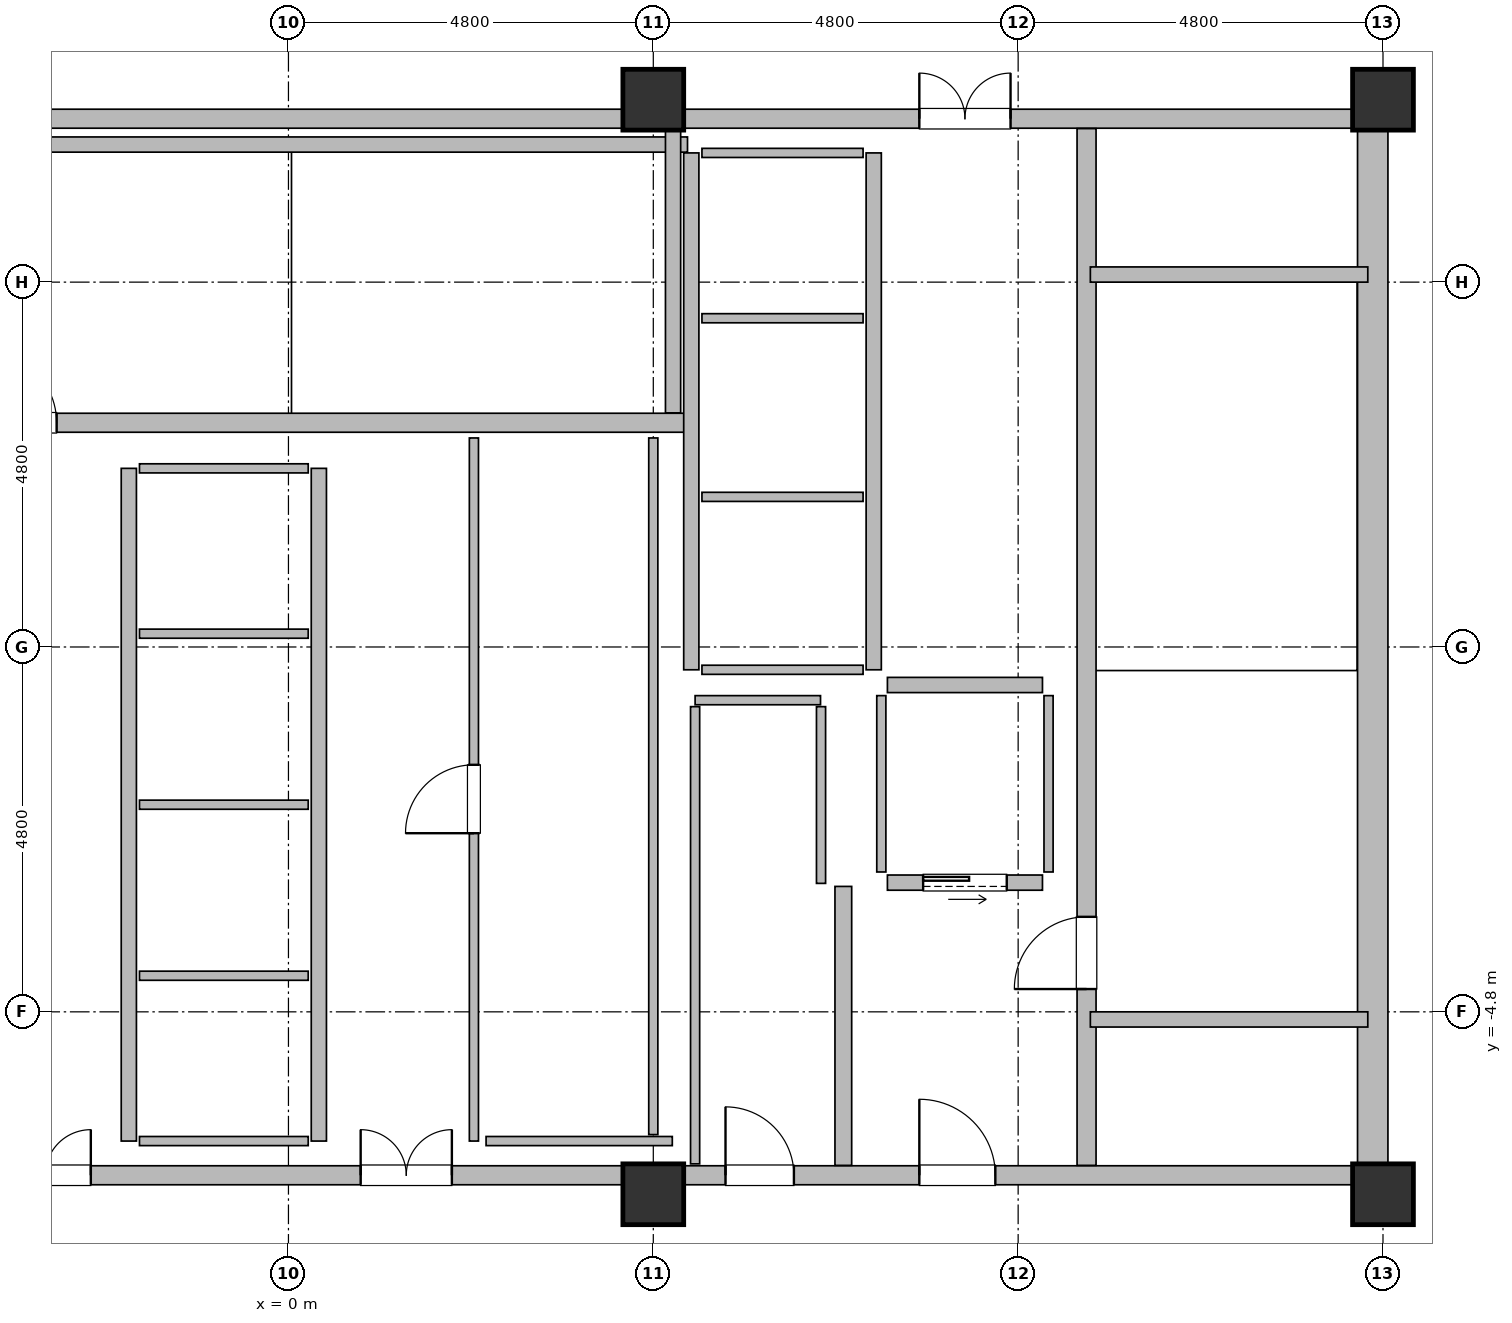
"""IFC4 building model, lengths in metres.
Left out: names, types, materials, properties, quantities, classifications, styles, units other than length and angle.
Written with IfcOpenShell. Run it as: python <this file> out.ifc"""

import sys

from ifc_helpers import new_model, si_unit, direction, frame, frame_2d, origin, origin_2d, place, context, subcontext, project, spatial, rectangle, hollow_rectangle, extrude, element, fill, save


model = new_model("IFC4")
c1 = context("Model", 3, precision=1e-05, world=origin(), true_north=direction((0.0, 1.0)))
c2 = subcontext(c1, "Body", "Model", "MODEL_VIEW")
j1 = project(units=[si_unit("LENGTHUNIT", "METRE"), si_unit("PLANEANGLEUNIT", "RADIAN")], contexts=[c1])
p1 = place(None, origin())
s1 = spatial("IfcSite", under=j1, at=p1, CompositionType="ELEMENT")
p2 = place(p1, origin())
s2 = spatial("IfcBuilding", under=s1, at=p2, CompositionType="ELEMENT")
p3 = place(p2, frame((0.0, 0.0, 48.5)))
s3 = spatial("IfcBuildingStorey", under=s2, at=p3, CompositionType="ELEMENT", Elevation=48.5)
for number, where, z_axis, x_axis in (
    (1, (4.8, -7.2, 0.0), (0.0, 0.0, 1.0), (1.0, 0.0, 0.0)),
    (2, (4.8, 7.2, 0.0), (0.0, 0.0, 1.0), (1.0, 0.0, 0.0)),
    (3, (14.4, -7.2, 0.0), (0.0, 0.0, 1.0), (1.0, 0.0, 0.0)),
    (4, (14.4, 7.2, 0.0), (0.0, 0.0, 1.0), (1.0, 0.0, 0.0)),
):
    element("IfcColumn", number, at=place(p3, frame(where, z_axis=z_axis, x_axis=x_axis)), inside=s3, PredefinedType="COLUMN", context=c2, shape_type="SweptSolid", body=[
        extrude(hollow_rectangle(XDim=0.8, YDim=0.8, WallThickness=0.036, at=origin_2d()), origin(), (0.0, 0.0, 1.0), 3.7),
    ])
p4 = place(p3, frame((14.265, -7.2, -0.18), z_axis=(0.0, 0.0, 1.0), x_axis=(0.0, 1.0, 0.0)))
e5 = element("IfcWall", 5, at=p4, inside=s3, PredefinedType="SHEAR", context=c2, shape_type="SweptSolid", body=[
    extrude(rectangle(XDim=14.4, YDim=0.4, at=frame_2d((7.2, 0.0))), origin(), (0.0, 0.0, 1.0), 3.7),
])
p5 = place(p3, frame((-4.6, -6.95, 0.0), z_axis=(0.0, 0.0, 1.0), x_axis=(1.0, 0.0, 0.0)))
e6 = element("IfcWall", 6, at=p5, inside=s3, PredefinedType="SOLIDWALL", context=c2, shape_type="SweptSolid", body=[
    extrude(rectangle(XDim=9.2, YDim=0.25, at=frame_2d((4.6, 0.0))), origin(), (0.0, 0.0, 1.0), 2.32),
])
p6 = place(p5, frame((0.8, 0.0, 0.0)))
e7 = element("IfcOpeningElement", 7, at=p6, cuts=e6, PredefinedType="OPENING", context=c2, shape_type="SweptSolid", body=[
    extrude(rectangle(XDim=1.2, YDim=2.2, at=frame_2d((0.6, 1.1))), frame((0.0, 0.14, 0.0), z_axis=(0.0, -1.0, 0.0), x_axis=(1.0, 0.0, 0.0)), (0.0, 0.0, 1.0), 0.28),
])
p7 = place(p5, frame((5.55, 0.0, 0.0)))
e8 = element("IfcOpeningElement", 8, at=p7, cuts=e6, PredefinedType="OPENING", context=c2, shape_type="SweptSolid", body=[
    extrude(rectangle(XDim=1.2, YDim=2.2, at=frame_2d((0.6, 1.1))), frame((0.0, 0.14, 0.0), z_axis=(0.0, -1.0, 0.0), x_axis=(1.0, 0.0, 0.0)), (0.0, 0.0, 1.0), 0.28),
])
p8 = place(p3, frame((4.8, -6.95, 0.0), z_axis=(0.0, 0.0, 1.0), x_axis=(1.0, 0.0, 0.0)))
e9 = element("IfcWall", 9, at=p8, inside=s3, PredefinedType="SOLIDWALL", context=c2, shape_type="SweptSolid", body=[
    extrude(rectangle(XDim=9.4, YDim=0.25, at=frame_2d((4.7, 0.0))), origin(), (0.0, 0.0, 1.0), 2.62),
])
p9 = place(p8, frame((3.5, 0.0, 0.0)))
e10 = element("IfcOpeningElement", 10, at=p9, cuts=e9, PredefinedType="OPENING", context=c2, shape_type="SweptSolid", body=[
    extrude(rectangle(XDim=1.0, YDim=2.15, at=frame_2d((0.5, 1.075))), frame((0.0, 0.14, 0.0), z_axis=(0.0, -1.0, 0.0), x_axis=(1.0, 0.0, 0.0)), (0.0, 0.0, 1.0), 0.28),
])
p10 = place(p8, frame((0.95, 0.0, 0.0)))
e11 = element("IfcOpeningElement", 11, at=p10, cuts=e9, PredefinedType="OPENING", context=c2, shape_type="SweptSolid", body=[
    extrude(rectangle(XDim=0.9, YDim=2.1, at=frame_2d((0.45, 1.05))), frame((0.0, 0.14, 0.0), z_axis=(0.0, -1.0, 0.0), x_axis=(1.0, 0.0, 0.0)), (0.0, 0.0, 1.0), 0.28),
])
p11 = place(p3, frame((-4.6, 6.95, 0.0), z_axis=(0.0, 0.0, 1.0), x_axis=(1.0, 0.0, 0.0)))
e12 = element("IfcWall", 12, at=p11, inside=s3, PredefinedType="SOLIDWALL", context=c2, shape_type="SweptSolid", body=[
    extrude(rectangle(XDim=9.2, YDim=0.25, at=frame_2d((4.6, 0.0))), origin(), (0.0, 0.0, 1.0), 2.62),
])
p12 = place(p3, frame((4.8, 6.95, 0.0), z_axis=(0.0, 0.0, 1.0), x_axis=(1.0, 0.0, 0.0)))
e13 = element("IfcWall", 13, at=p12, inside=s3, PredefinedType="SOLIDWALL", context=c2, shape_type="SweptSolid", body=[
    extrude(rectangle(XDim=9.4, YDim=0.25, at=frame_2d((4.7, 0.0))), origin(), (0.0, 0.0, 1.0), 2.62),
])
p13 = place(p12, frame((3.5, 0.0, 0.0)))
e14 = element("IfcOpeningElement", 14, at=p13, cuts=e13, PredefinedType="OPENING", context=c2, shape_type="SweptSolid", body=[
    extrude(rectangle(XDim=1.2, YDim=2.2, at=frame_2d((0.6, 1.1))), frame((0.0, 0.14, 0.0), z_axis=(0.0, -1.0, 0.0), x_axis=(1.0, 0.0, 0.0)), (0.0, 0.0, 1.0), 0.28),
])
p14 = place(p3, frame((7.3, -6.82, 0.0), z_axis=(0.0, 0.0, 1.0), x_axis=(0.0, 1.0, 0.0)))
e15 = element("IfcWall", 15, at=p14, inside=s3, PredefinedType="SOLIDWALL", context=c2, shape_type="SweptSolid", body=[
    extrude(rectangle(XDim=3.67, YDim=0.22, at=frame_2d((1.835, 0.0))), origin(), (0.0, 0.0, 1.0), 2.62),
])
p15 = place(p3, frame((10.5, -6.82, -0.18), z_axis=(0.0, 0.0, 1.0), x_axis=(0.0, 1.0, 0.0)))
e16 = element("IfcWall", 16, at=p15, inside=s3, PredefinedType="SOLIDWALL", context=c2, shape_type="SweptSolid", body=[
    extrude(rectangle(XDim=13.64, YDim=0.25, at=frame_2d((6.82, 0.0))), origin(), (0.0, 0.0, 1.0), 3.7),
])
p16 = place(p15, frame((2.32, 0.0, 0.18)))
e17 = element("IfcOpeningElement", 17, at=p16, cuts=e16, PredefinedType="OPENING", context=c2, shape_type="SweptSolid", body=[
    extrude(rectangle(XDim=0.95, YDim=2.15, at=frame_2d((0.475, 1.075))), frame((0.0, 0.14, 0.0), z_axis=(0.0, -1.0, 0.0), x_axis=(1.0, 0.0, 0.0)), (0.0, 0.0, 1.0), 0.28),
])
for number, where, z_axis, x_axis in (
    (18, (10.55, -4.9, -0.18), (0.0, 0.0, 1.0), (1.0, 0.0, 0.0)),
    (19, (10.55, 4.9, -0.18), (0.0, 0.0, 1.0), (1.0, 0.0, 0.0)),
):
    element("IfcWall", number, at=place(p3, frame(where, z_axis=z_axis, x_axis=x_axis)), inside=s3, PredefinedType="SOLIDWALL", context=c2, shape_type="SweptSolid", body=[
        extrude(rectangle(XDim=3.65, YDim=0.2, at=frame_2d((1.825, 0.0))), origin(), (0.0, 0.0, 1.0), 3.7),
    ])
p17 = place(p3, frame((-4.65, 2.95, -0.18), z_axis=(0.0, 0.0, 1.0), x_axis=(1.0, 0.0, 0.0)))
e20 = element("IfcWall", 20, at=p17, inside=s3, PredefinedType="SOLIDWALL", context=c2, shape_type="SweptSolid", body=[
    extrude(rectangle(XDim=9.9, YDim=0.25, at=frame_2d((4.95, 0.0))), origin(), (0.0, 0.0, 1.0), 3.7),
])
p18 = place(p17, frame((0.65, 0.0, 0.18)))
e21 = element("IfcOpeningElement", 21, at=p18, cuts=e20, PredefinedType="OPENING", context=c2, shape_type="SweptSolid", body=[
    extrude(rectangle(XDim=0.95, YDim=2.15, at=frame_2d((0.475, 1.075))), frame((0.0, 0.14, 0.0), z_axis=(0.0, -1.0, 0.0), x_axis=(1.0, 0.0, 0.0)), (0.0, 0.0, 1.0), 0.28),
])
p19 = place(p3, frame((-4.65, 6.61, -0.18), z_axis=(0.0, 0.0, 1.0), x_axis=(1.0, 0.0, 0.0)))
e22 = element("IfcWall", 22, at=p19, inside=s3, PredefinedType="SOLIDWALL", context=c2, shape_type="SweptSolid", body=[
    extrude(rectangle(XDim=9.9, YDim=0.2, at=frame_2d((4.95, 0.0))), origin(), (0.0, 0.0, 1.0), 3.7),
])
p20 = place(p3, frame((5.06, 3.08, -0.18), z_axis=(0.0, 0.0, 1.0), x_axis=(0.0, 1.0, 0.0)))
e23 = element("IfcWall", 23, at=p20, inside=s3, PredefinedType="SOLIDWALL", context=c2, shape_type="SweptSolid", body=[
    extrude(rectangle(XDim=3.74, YDim=0.2, at=frame_2d((1.87, 0.0))), origin(), (0.0, 0.0, 1.0), 3.7),
])
for number, where, z_axis, x_axis in (
    (24, (-2.1, -6.5, 0.0), (0.0, 0.0, 1.0), (0.0, 1.0, 0.0)),
    (25, (0.4, -6.5, 0.0), (0.0, 0.0, 1.0), (0.0, 1.0, 0.0)),
):
    element("IfcWall", number, at=place(p3, frame(where, z_axis=z_axis, x_axis=x_axis)), inside=s3, PredefinedType="SOLIDWALL", context=c2, shape_type="SweptSolid", body=[
        extrude(rectangle(XDim=8.85, YDim=0.2, at=frame_2d((4.425, 0.0))), origin(), (0.0, 0.0, 1.0), 3.52),
    ])
for number, where, z_axis, x_axis in (
    (26, (-1.96, -6.5, 0.0), (0.0, 0.0, 1.0), (1.0, 0.0, 0.0)),
    (27, (-1.96, -4.325, 0.0), (0.0, 0.0, 1.0), (1.0, 0.0, 0.0)),
    (28, (-1.96, -2.075, 0.0), (0.0, 0.0, 1.0), (1.0, 0.0, 0.0)),
    (29, (-1.96, 0.175, 0.0), (0.0, 0.0, 1.0), (1.0, 0.0, 0.0)),
    (30, (-1.96, 2.35, 0.0), (0.0, 0.0, 1.0), (1.0, 0.0, 0.0)),
):
    element("IfcWall", number, at=place(p3, frame(where, z_axis=z_axis, x_axis=x_axis)), inside=s3, PredefinedType="PARTITIONING", context=c2, shape_type="SweptSolid", body=[
        extrude(rectangle(XDim=2.22, YDim=0.12, at=frame_2d((1.11, 0.0))), origin(), (0.0, 0.0, 1.0), 3.52),
    ])
for number, where, z_axis, x_axis in (
    (31, (7.7, -0.3, 0.0), (0.0, 0.0, 1.0), (0.0, 1.0, 0.0)),
    (32, (5.3, -0.3, 0.0), (0.0, 0.0, 1.0), (0.0, 1.0, 0.0)),
):
    element("IfcWall", number, at=place(p3, frame(where, z_axis=z_axis, x_axis=x_axis)), inside=s3, PredefinedType="SOLIDWALL", context=c2, shape_type="SweptSolid", body=[
        extrude(rectangle(XDim=6.8, YDim=0.2, at=frame_2d((3.4, 0.0))), origin(), (0.0, 0.0, 1.0), 3.52),
    ])
for number, where, z_axis, x_axis in (
    (33, (5.44, -0.3, 0.0), (0.0, 0.0, 1.0), (1.0, 0.0, 0.0)),
    (34, (5.44, 1.975, 0.0), (0.0, 0.0, 1.0), (1.0, 0.0, 0.0)),
    (35, (5.44, 4.325, 0.0), (0.0, 0.0, 1.0), (1.0, 0.0, 0.0)),
    (36, (5.44, 6.5, 0.0), (0.0, 0.0, 1.0), (1.0, 0.0, 0.0)),
):
    element("IfcWall", number, at=place(p3, frame(where, z_axis=z_axis, x_axis=x_axis)), inside=s3, PredefinedType="PARTITIONING", context=c2, shape_type="SweptSolid", body=[
        extrude(rectangle(XDim=2.12, YDim=0.12, at=frame_2d((1.06, 0.0))), origin(), (0.0, 0.0, 1.0), 3.52),
    ])
p21 = place(p3, frame((7.88, -3.1, 0.0), z_axis=(0.0, 0.0, 1.0), x_axis=(1.0, 0.0, 0.0)))
e37 = element("IfcWall", 37, at=p21, inside=s3, PredefinedType="SOLIDWALL", context=c2, shape_type="SweptSolid", body=[
    extrude(rectangle(XDim=2.04, YDim=0.2, at=frame_2d((1.02, 0.0))), origin(), (0.0, 0.0, 1.0), 3.52),
])
p22 = place(p21, frame((0.47, 0.0, 0.0)))
e38 = element("IfcOpeningElement", 38, at=p22, cuts=e37, PredefinedType="OPENING", context=c2, shape_type="SweptSolid", body=[
    extrude(rectangle(XDim=1.1, YDim=2.2, at=frame_2d((0.55, 1.1))), frame((0.0, 0.115, 0.0), z_axis=(0.0, -1.0, 0.0), x_axis=(1.0, 0.0, 0.0)), (0.0, 0.0, 1.0), 0.23),
])
p23 = place(p3, frame((7.88, -0.5, 0.0), z_axis=(0.0, 0.0, 1.0), x_axis=(1.0, 0.0, 0.0)))
e39 = element("IfcWall", 39, at=p23, inside=s3, PredefinedType="SOLIDWALL", context=c2, shape_type="SweptSolid", body=[
    extrude(rectangle(XDim=2.04, YDim=0.2, at=frame_2d((1.02, 0.0))), origin(), (0.0, 0.0, 1.0), 3.52),
])
for number, where, z_axis, x_axis in (
    (40, (7.8, -2.96, 0.0), (0.0, 0.0, 1.0), (0.0, 1.0, 0.0)),
    (41, (10.0, -2.96, 0.0), (0.0, 0.0, 1.0), (0.0, 1.0, 0.0)),
):
    element("IfcWall", number, at=place(p3, frame(where, z_axis=z_axis, x_axis=x_axis)), inside=s3, PredefinedType="PARTITIONING", context=c2, shape_type="SweptSolid", body=[
        extrude(rectangle(XDim=2.32, YDim=0.12, at=frame_2d((1.16, 0.0))), origin(), (0.0, 0.0, 1.0), 3.52),
    ])
p24 = place(p3, frame((2.6, -6.5, 0.0), z_axis=(0.0, 0.0, 1.0), x_axis=(1.0, 0.0, 0.0)))
e42 = element("IfcWall", 42, at=p24, inside=s3, PredefinedType="PARTITIONING", context=c2, shape_type="SweptSolid", body=[
    extrude(rectangle(XDim=2.45, YDim=0.12, at=frame_2d((1.225, 0.0))), origin(), (0.0, 0.0, 1.0), 3.52),
])
p25 = place(p3, frame((5.35, -0.7, 0.0), z_axis=(0.0, 0.0, 1.0), x_axis=(1.0, 0.0, 0.0)))
e43 = element("IfcWall", 43, at=p25, inside=s3, PredefinedType="PARTITIONING", context=c2, shape_type="SweptSolid", body=[
    extrude(rectangle(XDim=1.65, YDim=0.12, at=frame_2d((0.825, 0.0))), origin(), (0.0, 0.0, 1.0), 3.52),
])
p26 = place(p3, frame((2.44, -6.5, 0.0), z_axis=(0.0, 0.0, 1.0), x_axis=(0.0, 1.0, 0.0)))
e44 = element("IfcWall", 44, at=p26, inside=s3, PredefinedType="PARTITIONING", context=c2, shape_type="SweptSolid", body=[
    extrude(rectangle(XDim=9.25, YDim=0.12, at=frame_2d((4.625, 0.0))), origin(), (0.0, 0.0, 1.0), 3.52),
])
p27 = place(p26, frame((4.05, 0.0, 0.0)))
e45 = element("IfcOpeningElement", 45, at=p27, cuts=e44, PredefinedType="OPENING", context=c2, shape_type="SweptSolid", body=[
    extrude(rectangle(XDim=0.9, YDim=2.1, at=frame_2d((0.45, 1.05))), frame((0.0, 0.075, 0.0), z_axis=(0.0, -1.0, 0.0), x_axis=(1.0, 0.0, 0.0)), (0.0, 0.0, 1.0), 0.15),
])
p28 = place(p3, frame((4.8, -6.415, 0.0), z_axis=(0.0, 0.0, 1.0), x_axis=(0.0, 1.0, 0.0)))
e46 = element("IfcWall", 46, at=p28, inside=s3, PredefinedType="PARTITIONING", context=c2, shape_type="SweptSolid", body=[
    extrude(rectangle(XDim=9.165, YDim=0.12, at=frame_2d((4.583, 0.0))), origin(), (0.0, 0.0, 1.0), 3.52),
])
p29 = place(p3, frame((5.35, -6.8, 0.0), z_axis=(0.0, 0.0, 1.0), x_axis=(0.0, 1.0, 0.0)))
e47 = element("IfcWall", 47, at=p29, inside=s3, PredefinedType="PARTITIONING", context=c2, shape_type="SweptSolid", body=[
    extrude(rectangle(XDim=6.015, YDim=0.12, at=frame_2d((3.008, 0.0))), origin(), (0.0, 0.0, 1.0), 2.62),
])
p30 = place(p3, frame((7.007, -3.11, 0.0), z_axis=(0.0, 0.0, 1.0), x_axis=(0.0, 1.0, 0.0)))
e48 = element("IfcWall", 48, at=p30, inside=s3, PredefinedType="PARTITIONING", context=c2, shape_type="SweptSolid", body=[
    extrude(rectangle(XDim=2.325, YDim=0.12, at=frame_2d((1.163, 0.0))), origin(), (0.0, 0.0, 1.0), 3.52),
])
p31 = place(p9, origin())
e49 = element("IfcDoor", 49, at=p31, inside=s3, OperationType="SINGLE_SWING_RIGHT", PredefinedType="DOOR", context=c2, shape_type="SweptSolid", body=[
    extrude(rectangle(XDim=1.0, YDim=2.15, at=frame_2d((0.5, 1.075))), frame((0.0, 0.025, 0.0), z_axis=(0.0, -1.0, 0.0), x_axis=(1.0, 0.0, 0.0)), (0.0, 0.0, 1.0), 0.05),
])
fill(e10, e49)
p32 = place(p6, origin())
e50 = element("IfcDoor", 50, at=p32, inside=s3, OperationType="DOUBLE_DOOR_SINGLE_SWING", PredefinedType="DOOR", context=c2, shape_type="SweptSolid", body=[
    extrude(rectangle(XDim=1.2, YDim=2.2, at=frame_2d((0.6, 1.1))), frame((0.0, 0.025, 0.0), z_axis=(0.0, -1.0, 0.0), x_axis=(1.0, 0.0, 0.0)), (0.0, 0.0, 1.0), 0.05),
])
fill(e7, e50)
p33 = place(p7, origin())
e51 = element("IfcDoor", 51, at=p33, inside=s3, OperationType="DOUBLE_DOOR_SINGLE_SWING", PredefinedType="DOOR", context=c2, shape_type="SweptSolid", body=[
    extrude(rectangle(XDim=1.2, YDim=2.2, at=frame_2d((0.6, 1.1))), frame((0.0, 0.025, 0.0), z_axis=(0.0, -1.0, 0.0), x_axis=(1.0, 0.0, 0.0)), (0.0, 0.0, 1.0), 0.05),
])
fill(e8, e51)
p34 = place(p13, origin())
e52 = element("IfcDoor", 52, at=p34, inside=s3, OperationType="DOUBLE_DOOR_SINGLE_SWING", PredefinedType="DOOR", context=c2, shape_type="SweptSolid", body=[
    extrude(rectangle(XDim=1.2, YDim=2.2, at=frame_2d((0.6, 1.1))), frame((0.0, 0.025, 0.0), z_axis=(0.0, -1.0, 0.0), x_axis=(1.0, 0.0, 0.0)), (0.0, 0.0, 1.0), 0.05),
])
fill(e14, e52)
p35 = place(p16, origin())
e53 = element("IfcDoor", 53, at=p35, inside=s3, OperationType="SINGLE_SWING_LEFT", PredefinedType="DOOR", context=c2, shape_type="SweptSolid", body=[
    extrude(rectangle(XDim=0.95, YDim=2.15, at=frame_2d((0.475, 1.075))), frame((0.0, 0.025, 0.0), z_axis=(0.0, -1.0, 0.0), x_axis=(1.0, 0.0, 0.0)), (0.0, 0.0, 1.0), 0.05),
])
fill(e17, e53)
p36 = place(p18, origin())
e54 = element("IfcDoor", 54, at=p36, inside=s3, OperationType="SINGLE_SWING_RIGHT", PredefinedType="DOOR", context=c2, shape_type="SweptSolid", body=[
    extrude(rectangle(XDim=0.95, YDim=2.15, at=frame_2d((0.475, 1.075))), frame((0.0, 0.025, 0.0), z_axis=(0.0, -1.0, 0.0), x_axis=(1.0, 0.0, 0.0)), (0.0, 0.0, 1.0), 0.05),
])
fill(e21, e54)
p37 = place(p22, origin())
e55 = element("IfcDoor", 55, at=p37, inside=s3, OperationType="SLIDING_TO_LEFT", PredefinedType="DOOR", context=c2, shape_type="SweptSolid", body=[
    extrude(rectangle(XDim=1.1, YDim=2.2, at=frame_2d((0.55, 1.1))), frame((0.0, 0.025, 0.0), z_axis=(0.0, -1.0, 0.0), x_axis=(1.0, 0.0, 0.0)), (0.0, 0.0, 1.0), 0.05),
])
fill(e38, e55)
p38 = place(p27, origin())
e56 = element("IfcDoor", 56, at=p38, inside=s3, OperationType="SINGLE_SWING_RIGHT", PredefinedType="DOOR", context=c2, shape_type="SweptSolid", body=[
    extrude(rectangle(XDim=0.9, YDim=2.1, at=frame_2d((0.45, 1.05))), frame((0.0, 0.025, 0.0), z_axis=(0.0, -1.0, 0.0), x_axis=(1.0, 0.0, 0.0)), (0.0, 0.0, 1.0), 0.05),
])
fill(e45, e56)
p39 = place(p10, origin())
e57 = element("IfcDoor", 57, at=p39, inside=s3, OperationType="SINGLE_SWING_LEFT", PredefinedType="DOOR", context=c2, shape_type="SweptSolid", body=[
    extrude(rectangle(XDim=0.9, YDim=2.1, at=frame_2d((0.45, 1.05))), frame((0.0, 0.025, 0.0), z_axis=(0.0, -1.0, 0.0), x_axis=(1.0, 0.0, 0.0)), (0.0, 0.0, 1.0), 0.05),
])
fill(e11, e57)
save(model, sys.argv[1])
